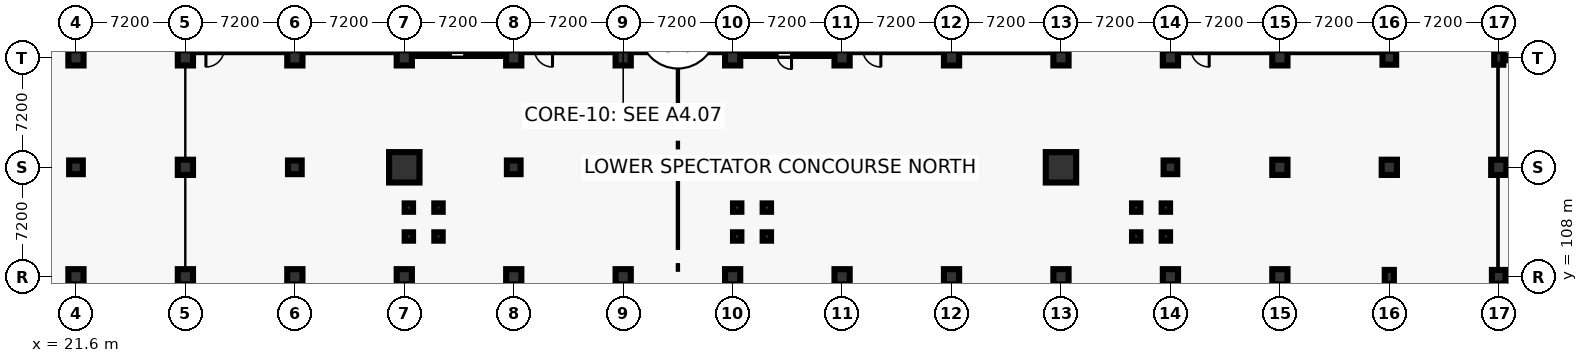
"""IFC4 building model, lengths in metres.
Left out: names, types, materials, properties, quantities, classifications, styles, units other than length and angle.
Written with IfcOpenShell. Run it as: python <this file> out.ifc"""

import sys

from ifc_helpers import new_model, si_unit, direction, frame, frame_2d, origin, origin_2d, place, context, subcontext, project, spatial, rectangle, circle, extrude, element, fill, save


model = new_model("IFC4")
c1 = context("Model", 3, precision=1e-05, world=origin(), true_north=direction((0.0, 1.0)))
c2 = subcontext(c1, "Body", "Model", "MODEL_VIEW")
j1 = project(units=[si_unit("LENGTHUNIT", "METRE"), si_unit("PLANEANGLEUNIT", "RADIAN")], contexts=[c1])
p1 = place(None, origin())
s1 = spatial("IfcSite", under=j1, at=p1, CompositionType="ELEMENT")
p2 = place(p1, origin())
s2 = spatial("IfcBuilding", under=s1, at=p2, CompositionType="ELEMENT")
p3 = place(p2, origin())
s3 = spatial("IfcBuildingStorey", under=s2, at=p3, CompositionType="ELEMENT", Elevation=0.0)
p4 = place(p3, frame((21.6, 108.0, 0.0), z_axis=(0.0, 0.0, 1.0), x_axis=(1.0, 0.0, 0.0)))
e1 = element("IfcColumn", 1, at=p4, inside=s3, PredefinedType="COLUMN", context=c2, shape_type="SweptSolid", body=[
    extrude(rectangle(XDim=1.0, YDim=1.0, at=origin_2d()), origin(), (0.0, 0.0, 1.0), 5.4),
])
p5 = place(p3, frame((21.6, 115.2, 0.0), z_axis=(0.0, 0.0, 1.0), x_axis=(1.0, 0.0, 0.0)))
e2 = element("IfcColumn", 2, at=p5, inside=s3, PredefinedType="COLUMN", context=c2, shape_type="SweptSolid", body=[
    extrude(rectangle(XDim=0.9, YDim=0.9, at=origin_2d()), origin(), (0.0, 0.0, 1.0), 5.4),
])
p6 = place(p3, frame((21.6, 122.4, 0.0), z_axis=(0.0, 0.0, 1.0), x_axis=(1.0, 0.0, 0.0)))
e3 = element("IfcColumn", 3, at=p6, inside=s3, PredefinedType="COLUMN", context=c2, shape_type="SweptSolid", body=[
    extrude(circle(Radius=0.5, at=origin_2d()), origin(), (0.0, 0.0, 1.0), 5.4),
])
p7 = place(p3, frame((28.8, 108.0, 0.0), z_axis=(0.0, 0.0, 1.0), x_axis=(1.0, 0.0, 0.0)))
e4 = element("IfcColumn", 4, at=p7, inside=s3, PredefinedType="COLUMN", context=c2, shape_type="SweptSolid", body=[
    extrude(rectangle(XDim=1.0, YDim=1.0, at=origin_2d()), origin(), (0.0, 0.0, 1.0), 5.4),
])
for number, where, z_axis, x_axis in (
    (5, (28.8, 115.2, 0.0), (0.0, 0.0, 1.0), (1.0, 0.0, 0.0)),
    (6, (28.8, 122.4, 0.0), (0.0, 0.0, 1.0), (1.0, 0.0, 0.0)),
):
    element("IfcColumn", number, at=place(p3, frame(where, z_axis=z_axis, x_axis=x_axis)), inside=s3, PredefinedType="COLUMN", context=c2, shape_type="SweptSolid", body=[
        extrude(circle(Radius=0.5, at=origin_2d()), origin(), (0.0, 0.0, 1.0), 5.4),
    ])
p8 = place(p3, frame((36.0, 108.0, 0.0), z_axis=(0.0, 0.0, 1.0), x_axis=(1.0, 0.0, 0.0)))
e7 = element("IfcColumn", 7, at=p8, inside=s3, PredefinedType="COLUMN", context=c2, shape_type="SweptSolid", body=[
    extrude(rectangle(XDim=1.0, YDim=1.0, at=origin_2d()), origin(), (0.0, 0.0, 1.0), 5.4),
])
p9 = place(p3, frame((36.0, 115.2, 0.0), z_axis=(0.0, 0.0, 1.0), x_axis=(1.0, 0.0, 0.0)))
e8 = element("IfcColumn", 8, at=p9, inside=s3, PredefinedType="COLUMN", context=c2, shape_type="SweptSolid", body=[
    extrude(rectangle(XDim=0.9, YDim=0.9, at=origin_2d()), origin(), (0.0, 0.0, 1.0), 5.4),
])
p10 = place(p3, frame((36.0, 122.4, 0.0), z_axis=(0.0, 0.0, 1.0), x_axis=(1.0, 0.0, 0.0)))
e9 = element("IfcColumn", 9, at=p10, inside=s3, PredefinedType="COLUMN", context=c2, shape_type="SweptSolid", body=[
    extrude(circle(Radius=0.5, at=origin_2d()), origin(), (0.0, 0.0, 1.0), 5.4),
])
p11 = place(p3, frame((43.2, 108.0, 0.0), z_axis=(0.0, 0.0, 1.0), x_axis=(1.0, 0.0, 0.0)))
e10 = element("IfcColumn", 10, at=p11, inside=s3, PredefinedType="COLUMN", context=c2, shape_type="SweptSolid", body=[
    extrude(rectangle(XDim=1.0, YDim=1.0, at=origin_2d()), origin(), (0.0, 0.0, 1.0), 5.4),
])
p12 = place(p3, frame((43.2, 115.2, 0.0), z_axis=(0.0, 0.0, 1.0), x_axis=(1.0, 0.0, 0.0)))
e11 = element("IfcColumn", 11, at=p12, inside=s3, PredefinedType="COLUMN", context=c2, shape_type="SweptSolid", body=[
    extrude(circle(Radius=1.0, at=origin_2d()), origin(), (0.0, 0.0, 1.0), 5.4),
])
p13 = place(p3, frame((43.2, 122.4, 0.0), z_axis=(0.0, 0.0, 1.0), x_axis=(1.0, 0.0, 0.0)))
e12 = element("IfcColumn", 12, at=p13, inside=s3, PredefinedType="COLUMN", context=c2, shape_type="SweptSolid", body=[
    extrude(circle(Radius=0.5, at=origin_2d()), origin(), (0.0, 0.0, 1.0), 5.4),
])
p14 = place(p3, frame((50.4, 108.0, 0.0), z_axis=(0.0, 0.0, 1.0), x_axis=(1.0, 0.0, 0.0)))
e13 = element("IfcColumn", 13, at=p14, inside=s3, PredefinedType="COLUMN", context=c2, shape_type="SweptSolid", body=[
    extrude(rectangle(XDim=1.0, YDim=1.0, at=origin_2d()), origin(), (0.0, 0.0, 1.0), 5.4),
])
p15 = place(p3, frame((50.4, 115.2, 0.0), z_axis=(0.0, 0.0, 1.0), x_axis=(1.0, 0.0, 0.0)))
e14 = element("IfcColumn", 14, at=p15, inside=s3, PredefinedType="COLUMN", context=c2, shape_type="SweptSolid", body=[
    extrude(rectangle(XDim=0.9, YDim=0.9, at=origin_2d()), origin(), (0.0, 0.0, 1.0), 5.4),
])
p16 = place(p3, frame((50.4, 122.4, 0.0), z_axis=(0.0, 0.0, 1.0), x_axis=(1.0, 0.0, 0.0)))
e15 = element("IfcColumn", 15, at=p16, inside=s3, PredefinedType="COLUMN", context=c2, shape_type="SweptSolid", body=[
    extrude(circle(Radius=0.5, at=origin_2d()), origin(), (0.0, 0.0, 1.0), 5.4),
])
p17 = place(p3, frame((57.6, 108.0, 0.0), z_axis=(0.0, 0.0, 1.0), x_axis=(1.0, 0.0, 0.0)))
e16 = element("IfcColumn", 16, at=p17, inside=s3, PredefinedType="COLUMN", context=c2, shape_type="SweptSolid", body=[
    extrude(rectangle(XDim=1.0, YDim=1.0, at=origin_2d()), origin(), (0.0, 0.0, 1.0), 5.4),
])
for number, where, z_axis, x_axis in (
    (17, (57.6, 115.2, 0.0), (0.0, 0.0, 1.0), (1.0, 0.0, 0.0)),
    (18, (57.6, 122.4, 0.0), (0.0, 0.0, 1.0), (1.0, 0.0, 0.0)),
):
    element("IfcColumn", number, at=place(p3, frame(where, z_axis=z_axis, x_axis=x_axis)), inside=s3, PredefinedType="COLUMN", context=c2, shape_type="SweptSolid", body=[
        extrude(circle(Radius=0.5, at=origin_2d()), origin(), (0.0, 0.0, 1.0), 5.4),
    ])
p18 = place(p3, frame((64.8, 108.0, 0.0), z_axis=(0.0, 0.0, 1.0), x_axis=(1.0, 0.0, 0.0)))
e19 = element("IfcColumn", 19, at=p18, inside=s3, PredefinedType="COLUMN", context=c2, shape_type="SweptSolid", body=[
    extrude(rectangle(XDim=1.0, YDim=1.0, at=origin_2d()), origin(), (0.0, 0.0, 1.0), 5.4),
])
p19 = place(p3, frame((64.8, 115.2, 0.0), z_axis=(0.0, 0.0, 1.0), x_axis=(1.0, 0.0, 0.0)))
e20 = element("IfcColumn", 20, at=p19, inside=s3, PredefinedType="COLUMN", context=c2, shape_type="SweptSolid", body=[
    extrude(rectangle(XDim=0.9, YDim=0.9, at=origin_2d()), origin(), (0.0, 0.0, 1.0), 5.4),
])
p20 = place(p3, frame((64.8, 122.4, 0.0), z_axis=(0.0, 0.0, 1.0), x_axis=(1.0, 0.0, 0.0)))
e21 = element("IfcColumn", 21, at=p20, inside=s3, PredefinedType="COLUMN", context=c2, shape_type="SweptSolid", body=[
    extrude(circle(Radius=0.5, at=origin_2d()), origin(), (0.0, 0.0, 1.0), 5.4),
])
p21 = place(p3, frame((72.0, 108.0, 0.0), z_axis=(0.0, 0.0, 1.0), x_axis=(1.0, 0.0, 0.0)))
e22 = element("IfcColumn", 22, at=p21, inside=s3, PredefinedType="COLUMN", context=c2, shape_type="SweptSolid", body=[
    extrude(rectangle(XDim=1.0, YDim=1.0, at=origin_2d()), origin(), (0.0, 0.0, 1.0), 5.4),
])
for number, where, z_axis, x_axis in (
    (23, (72.0, 115.2, 0.0), (0.0, 0.0, 1.0), (1.0, 0.0, 0.0)),
    (24, (72.0, 122.4, 0.0), (0.0, 0.0, 1.0), (1.0, 0.0, 0.0)),
):
    element("IfcColumn", number, at=place(p3, frame(where, z_axis=z_axis, x_axis=x_axis)), inside=s3, PredefinedType="COLUMN", context=c2, shape_type="SweptSolid", body=[
        extrude(circle(Radius=0.5, at=origin_2d()), origin(), (0.0, 0.0, 1.0), 5.4),
    ])
p22 = place(p3, frame((79.2, 108.0, 0.0), z_axis=(0.0, 0.0, 1.0), x_axis=(1.0, 0.0, 0.0)))
e25 = element("IfcColumn", 25, at=p22, inside=s3, PredefinedType="COLUMN", context=c2, shape_type="SweptSolid", body=[
    extrude(rectangle(XDim=1.0, YDim=1.0, at=origin_2d()), origin(), (0.0, 0.0, 1.0), 5.4),
])
p23 = place(p3, frame((79.2, 115.2, 0.0), z_axis=(0.0, 0.0, 1.0), x_axis=(1.0, 0.0, 0.0)))
e26 = element("IfcColumn", 26, at=p23, inside=s3, PredefinedType="COLUMN", context=c2, shape_type="SweptSolid", body=[
    extrude(rectangle(XDim=0.9, YDim=0.9, at=origin_2d()), origin(), (0.0, 0.0, 1.0), 5.4),
])
p24 = place(p3, frame((79.2, 122.4, 0.0), z_axis=(0.0, 0.0, 1.0), x_axis=(1.0, 0.0, 0.0)))
e27 = element("IfcColumn", 27, at=p24, inside=s3, PredefinedType="COLUMN", context=c2, shape_type="SweptSolid", body=[
    extrude(circle(Radius=0.5, at=origin_2d()), origin(), (0.0, 0.0, 1.0), 5.4),
])
p25 = place(p3, frame((86.4, 108.0, 0.0), z_axis=(0.0, 0.0, 1.0), x_axis=(1.0, 0.0, 0.0)))
e28 = element("IfcColumn", 28, at=p25, inside=s3, PredefinedType="COLUMN", context=c2, shape_type="SweptSolid", body=[
    extrude(rectangle(XDim=1.0, YDim=1.0, at=origin_2d()), origin(), (0.0, 0.0, 1.0), 5.4),
])
p26 = place(p3, frame((86.4, 115.2, 0.0), z_axis=(0.0, 0.0, 1.0), x_axis=(1.0, 0.0, 0.0)))
e29 = element("IfcColumn", 29, at=p26, inside=s3, PredefinedType="COLUMN", context=c2, shape_type="SweptSolid", body=[
    extrude(circle(Radius=1.0, at=origin_2d()), origin(), (0.0, 0.0, 1.0), 5.4),
])
p27 = place(p3, frame((86.4, 122.4, 0.0), z_axis=(0.0, 0.0, 1.0), x_axis=(1.0, 0.0, 0.0)))
e30 = element("IfcColumn", 30, at=p27, inside=s3, PredefinedType="COLUMN", context=c2, shape_type="SweptSolid", body=[
    extrude(circle(Radius=0.5, at=origin_2d()), origin(), (0.0, 0.0, 1.0), 5.4),
])
p28 = place(p3, frame((93.6, 108.0, 0.0), z_axis=(0.0, 0.0, 1.0), x_axis=(1.0, 0.0, 0.0)))
e31 = element("IfcColumn", 31, at=p28, inside=s3, PredefinedType="COLUMN", context=c2, shape_type="SweptSolid", body=[
    extrude(rectangle(XDim=1.0, YDim=1.0, at=origin_2d()), origin(), (0.0, 0.0, 1.0), 5.4),
])
p29 = place(p3, frame((93.6, 115.2, 0.0), z_axis=(0.0, 0.0, 1.0), x_axis=(1.0, 0.0, 0.0)))
e32 = element("IfcColumn", 32, at=p29, inside=s3, PredefinedType="COLUMN", context=c2, shape_type="SweptSolid", body=[
    extrude(rectangle(XDim=0.9, YDim=0.9, at=origin_2d()), origin(), (0.0, 0.0, 1.0), 5.4),
])
p30 = place(p3, frame((93.6, 122.4, 0.0), z_axis=(0.0, 0.0, 1.0), x_axis=(1.0, 0.0, 0.0)))
e33 = element("IfcColumn", 33, at=p30, inside=s3, PredefinedType="COLUMN", context=c2, shape_type="SweptSolid", body=[
    extrude(circle(Radius=0.5, at=origin_2d()), origin(), (0.0, 0.0, 1.0), 5.4),
])
p31 = place(p3, frame((100.8, 108.0, 0.0), z_axis=(0.0, 0.0, 1.0), x_axis=(1.0, 0.0, 0.0)))
e34 = element("IfcColumn", 34, at=p31, inside=s3, PredefinedType="COLUMN", context=c2, shape_type="SweptSolid", body=[
    extrude(rectangle(XDim=1.0, YDim=1.0, at=origin_2d()), origin(), (0.0, 0.0, 1.0), 5.4),
])
for number, where, z_axis, x_axis in (
    (35, (100.8, 115.2, 0.0), (0.0, 0.0, 1.0), (1.0, 0.0, 0.0)),
    (36, (100.8, 122.4, 0.0), (0.0, 0.0, 1.0), (1.0, 0.0, 0.0)),
):
    element("IfcColumn", number, at=place(p3, frame(where, z_axis=z_axis, x_axis=x_axis)), inside=s3, PredefinedType="COLUMN", context=c2, shape_type="SweptSolid", body=[
        extrude(circle(Radius=0.5, at=origin_2d()), origin(), (0.0, 0.0, 1.0), 5.4),
    ])
p32 = place(p3, frame((108.0, 108.0, 0.0), z_axis=(0.0, 0.0, 1.0), x_axis=(1.0, 0.0, 0.0)))
e37 = element("IfcColumn", 37, at=p32, inside=s3, PredefinedType="COLUMN", context=c2, shape_type="SweptSolid", body=[
    extrude(rectangle(XDim=0.6, YDim=0.9, at=origin_2d()), origin(), (0.0, 0.0, 1.0), 5.4),
])
p33 = place(p3, frame((108.0, 115.2, 0.0), z_axis=(0.0, 0.0, 1.0), x_axis=(1.0, 0.0, 0.0)))
e38 = element("IfcColumn", 38, at=p33, inside=s3, PredefinedType="COLUMN", context=c2, shape_type="SweptSolid", body=[
    extrude(rectangle(XDim=1.0, YDim=1.0, at=origin_2d()), origin(), (0.0, 0.0, 1.0), 5.4),
])
for number, where, z_axis, x_axis in (
    (39, (108.0, 122.4, 0.0), (0.0, 0.0, 1.0), (1.0, 0.0, 0.0)),
    (40, (115.2, 108.0, 0.0), (0.0, 0.0, 1.0), (1.0, 0.0, 0.0)),
):
    element("IfcColumn", number, at=place(p3, frame(where, z_axis=z_axis, x_axis=x_axis)), inside=s3, PredefinedType="COLUMN", context=c2, shape_type="SweptSolid", body=[
        extrude(rectangle(XDim=0.9, YDim=0.9, at=origin_2d()), origin(), (0.0, 0.0, 1.0), 5.4),
    ])
p34 = place(p3, frame((115.2, 115.2, 0.0), z_axis=(0.0, 0.0, 1.0), x_axis=(1.0, 0.0, 0.0)))
e41 = element("IfcColumn", 41, at=p34, inside=s3, PredefinedType="COLUMN", context=c2, shape_type="SweptSolid", body=[
    extrude(circle(Radius=0.5, at=origin_2d()), origin(), (0.0, 0.0, 1.0), 5.4),
])
p35 = place(p3, frame((115.2, 122.4, 0.0), z_axis=(0.0, 0.0, 1.0), x_axis=(1.0, 0.0, 0.0)))
e42 = element("IfcColumn", 42, at=p35, inside=s3, PredefinedType="COLUMN", context=c2, shape_type="SweptSolid", body=[
    extrude(rectangle(XDim=0.6, YDim=0.9, at=origin_2d()), origin(), (0.0, 0.0, 1.0), 5.4),
])
p36 = place(p3, frame((29.6, 123.0, 0.0), z_axis=(0.0, 0.0, 1.0), x_axis=(1.0, 0.0, 0.0)))
e43 = element("IfcWall", 43, at=p36, inside=s3, PredefinedType="SHEAR", context=c2, shape_type="SweptSolid", body=[
    extrude(rectangle(XDim=12.8, YDim=0.45, at=frame_2d((6.4, 0.0))), origin(), (0.0, 0.0, 1.0), 5.06),
])
p37 = place(p36, frame((0.55, 0.0, 0.0)))
e44 = element("IfcOpeningElement", 44, at=p37, cuts=e43, PredefinedType="OPENING", context=c2, shape_type="SweptSolid", body=[
    extrude(rectangle(XDim=1.2, YDim=2.25, at=frame_2d((0.6, 1.125))), frame((0.0, 0.235, 0.0), z_axis=(0.0, -1.0, 0.0), x_axis=(1.0, 0.0, 0.0)), (0.0, 0.0, 1.0), 0.47),
])
p38 = place(p36, frame((10.458, 0.0, 0.0)))
e45 = element("IfcOpeningElement", 45, at=p38, cuts=e43, PredefinedType="OPENING", context=c2, shape_type="SweptSolid", body=[
    extrude(rectangle(XDim=1.1, YDim=2.2, at=frame_2d((0.55, 1.1))), frame((0.0, 0.235, 0.0), z_axis=(0.0, -1.0, 0.0), x_axis=(1.0, 0.0, 0.0)), (0.0, 0.0, 1.0), 0.47),
])
p39 = place(p3, frame((72.8, 123.0, 0.0), z_axis=(0.0, 0.0, 1.0), x_axis=(1.0, 0.0, 0.0)))
e46 = element("IfcWall", 46, at=p39, inside=s3, PredefinedType="SHEAR", context=c2, shape_type="SweptSolid", body=[
    extrude(rectangle(XDim=12.8, YDim=0.45, at=frame_2d((6.4, 0.0))), origin(), (0.0, 0.0, 1.0), 5.06),
])
p40 = place(p39, frame((0.55, 0.0, 0.0)))
e47 = element("IfcOpeningElement", 47, at=p40, cuts=e46, PredefinedType="OPENING", context=c2, shape_type="SweptSolid", body=[
    extrude(rectangle(XDim=1.2, YDim=2.25, at=frame_2d((0.6, 1.125))), frame((0.0, 0.235, 0.0), z_axis=(0.0, -1.0, 0.0), x_axis=(1.0, 0.0, 0.0)), (0.0, 0.0, 1.0), 0.47),
])
p41 = place(p39, frame((10.458, 0.0, 0.0)))
e48 = element("IfcOpeningElement", 48, at=p41, cuts=e46, PredefinedType="OPENING", context=c2, shape_type="SweptSolid", body=[
    extrude(rectangle(XDim=1.1, YDim=2.2, at=frame_2d((0.55, 1.1))), frame((0.0, 0.235, 0.0), z_axis=(0.0, -1.0, 0.0), x_axis=(1.0, 0.0, 0.0)), (0.0, 0.0, 1.0), 0.47),
])
p42 = place(p3, frame((51.2, 123.0, 0.0), z_axis=(0.0, 0.0, 1.0), x_axis=(1.0, 0.0, 0.0)))
e49 = element("IfcWall", 49, at=p42, inside=s3, PredefinedType="SHEAR", context=c2, shape_type="SweptSolid", body=[
    extrude(rectangle(XDim=12.8, YDim=0.45, at=frame_2d((6.4, 0.0))), origin(), (0.0, 0.0, 1.0), 5.06),
])
p43 = place(p42, frame((0.55, 0.0, 0.0)))
e50 = element("IfcOpeningElement", 50, at=p43, cuts=e49, PredefinedType="OPENING", context=c2, shape_type="SweptSolid", body=[
    extrude(rectangle(XDim=1.2, YDim=2.25, at=frame_2d((0.6, 1.125))), frame((0.0, 0.235, 0.0), z_axis=(0.0, -1.0, 0.0), x_axis=(1.0, 0.0, 0.0)), (0.0, 0.0, 1.0), 0.47),
])
p44 = place(p42, frame((10.458, 0.0, 0.0)))
e51 = element("IfcOpeningElement", 51, at=p44, cuts=e49, PredefinedType="OPENING", context=c2, shape_type="SweptSolid", body=[
    extrude(rectangle(XDim=1.1, YDim=2.2, at=frame_2d((0.55, 1.1))), frame((0.0, 0.235, 0.0), z_axis=(0.0, -1.0, 0.0), x_axis=(1.0, 0.0, 0.0)), (0.0, 0.0, 1.0), 0.47),
])
p45 = place(p3, frame((94.4, 123.0, 0.0), z_axis=(0.0, 0.0, 1.0), x_axis=(1.0, 0.0, 0.0)))
e52 = element("IfcWall", 52, at=p45, inside=s3, PredefinedType="SHEAR", context=c2, shape_type="SweptSolid", body=[
    extrude(rectangle(XDim=12.8, YDim=0.45, at=frame_2d((6.4, 0.0))), origin(), (0.0, 0.0, 1.0), 5.06),
])
p46 = place(p45, frame((0.55, 0.0, 0.0)))
e53 = element("IfcOpeningElement", 53, at=p46, cuts=e52, PredefinedType="OPENING", context=c2, shape_type="SweptSolid", body=[
    extrude(rectangle(XDim=1.2, YDim=2.25, at=frame_2d((0.6, 1.125))), frame((0.0, 0.235, 0.0), z_axis=(0.0, -1.0, 0.0), x_axis=(1.0, 0.0, 0.0)), (0.0, 0.0, 1.0), 0.47),
])
p47 = place(p45, frame((10.108, 0.0, 0.0)))
e54 = element("IfcOpeningElement", 54, at=p47, cuts=e52, PredefinedType="OPENING", context=c2, shape_type="SweptSolid", body=[
    extrude(rectangle(XDim=1.8, YDim=2.4, at=frame_2d((0.9, 1.2))), frame((0.0, 0.235, 0.0), z_axis=(0.0, -1.0, 0.0), x_axis=(1.0, 0.0, 0.0)), (0.0, 0.0, 1.0), 0.47),
])
for number, where, z_axis, x_axis in (
    (55, (43.5, 110.65, 0.0), (0.0, 0.0, 1.0), (1.0, 0.0, 0.0)),
    (56, (45.45, 110.65, 0.0), (0.0, 0.0, 1.0), (1.0, 0.0, 0.0)),
    (57, (43.5, 112.55, 0.0), (0.0, 0.0, 1.0), (1.0, 0.0, 0.0)),
    (58, (45.45, 112.55, 0.0), (0.0, 0.0, 1.0), (1.0, 0.0, 0.0)),
    (59, (65.1, 110.65, 0.0), (0.0, 0.0, 1.0), (1.0, 0.0, 0.0)),
    (60, (67.05, 110.65, 0.0), (0.0, 0.0, 1.0), (1.0, 0.0, 0.0)),
    (61, (65.1, 112.55, 0.0), (0.0, 0.0, 1.0), (1.0, 0.0, 0.0)),
    (62, (67.05, 112.55, 0.0), (0.0, 0.0, 1.0), (1.0, 0.0, 0.0)),
    (63, (91.35, 110.65, 0.0), (0.0, 0.0, 1.0), (1.0, 0.0, 0.0)),
    (64, (93.3, 110.65, 0.0), (0.0, 0.0, 1.0), (1.0, 0.0, 0.0)),
    (65, (91.35, 112.55, 0.0), (0.0, 0.0, 1.0), (1.0, 0.0, 0.0)),
    (66, (93.3, 112.55, 0.0), (0.0, 0.0, 1.0), (1.0, 0.0, 0.0)),
):
    element("IfcColumn", number, at=place(p3, frame(where, z_axis=z_axis, x_axis=x_axis)), inside=s3, PredefinedType="COLUMN", context=c2, shape_type="SweptSolid", body=[
        extrude(rectangle(XDim=0.55, YDim=0.55, at=origin_2d()), origin(), (0.0, 0.0, 1.0), 5.4),
    ])
p48 = place(p3, frame((115.55, 122.4, 0.0), z_axis=(0.0, 0.0, 1.0), x_axis=(1.0, 0.0, 0.0)))
e67 = element("IfcWall", 67, at=p48, inside=s3, PredefinedType="SOLIDWALL", context=c2, shape_type="SweptSolid", body=[
    extrude(rectangle(XDim=6.5, YDim=0.31, at=frame_2d((3.25, 0.0))), origin(), (0.0, 0.0, 1.0), 4.1),
])
p49 = place(p48, frame((2.3, 0.0, 0.0)))
e68 = element("IfcOpeningElement", 68, at=p49, cuts=e67, PredefinedType="OPENING", context=c2, shape_type="SweptSolid", body=[
    extrude(rectangle(XDim=1.9, YDim=2.4, at=frame_2d((0.95, 1.2))), frame((0.0, 0.165, 0.0), z_axis=(0.0, -1.0, 0.0), x_axis=(1.0, 0.0, 0.0)), (0.0, 0.0, 1.0), 0.33),
])
p50 = place(p3, frame((43.6, 122.6, 0.0), z_axis=(0.0, 0.0, 1.0), x_axis=(1.0, 0.0, 0.0)))
e69 = element("IfcWall", 69, at=p50, inside=s3, PredefinedType="PARTITIONING", context=c2, shape_type="SweptSolid", body=[
    extrude(rectangle(XDim=6.2, YDim=0.15, at=frame_2d((3.1, 0.0))), origin(), (0.0, 0.0, 1.0), 4.1),
])
p51 = place(p50, frame((2.625, 0.0, 0.0)))
e70 = element("IfcOpeningElement", 70, at=p51, cuts=e69, PredefinedType="OPENING", context=c2, shape_type="SweptSolid", body=[
    extrude(rectangle(XDim=0.95, YDim=2.15, at=frame_2d((0.475, 1.075))), frame((0.0, 0.085, 0.0), z_axis=(0.0, -1.0, 0.0), x_axis=(1.0, 0.0, 0.0)), (0.0, 0.0, 1.0), 0.17),
])
for number, where, z_axis, x_axis in (
    (71, (49.8, 122.6, 0.0), (0.0, 0.0, 1.0), (0.0, 1.0, 0.0)),
    (72, (43.6, 128.4, 0.0), (0.0, 0.0, 1.0), (0.0, -1.0, 0.0)),
):
    element("IfcWall", number, at=place(p3, frame(where, z_axis=z_axis, x_axis=x_axis)), inside=s3, PredefinedType="PARTITIONING", context=c2, shape_type="SweptSolid", body=[
        extrude(rectangle(XDim=5.8, YDim=0.15, at=frame_2d((2.9, 0.0))), origin(), (0.0, 0.0, 1.0), 4.1),
    ])
p52 = place(p3, frame((65.2, 122.6, 0.0), z_axis=(0.0, 0.0, 1.0), x_axis=(1.0, 0.0, 0.0)))
e73 = element("IfcWall", 73, at=p52, inside=s3, PredefinedType="PARTITIONING", context=c2, shape_type="SweptSolid", body=[
    extrude(rectangle(XDim=6.0, YDim=0.15, at=frame_2d((3.0, 0.0))), origin(), (0.0, 0.0, 1.0), 4.1),
])
p53 = place(p52, frame((2.525, 0.0, 0.0)))
e74 = element("IfcOpeningElement", 74, at=p53, cuts=e73, PredefinedType="OPENING", context=c2, shape_type="SweptSolid", body=[
    extrude(rectangle(XDim=0.95, YDim=2.15, at=frame_2d((0.475, 1.075))), frame((0.0, 0.085, 0.0), z_axis=(0.0, -1.0, 0.0), x_axis=(1.0, 0.0, 0.0)), (0.0, 0.0, 1.0), 0.17),
])
for number, where, z_axis, x_axis in (
    (75, (71.2, 122.6, 0.0), (0.0, 0.0, 1.0), (0.0, 1.0, 0.0)),
    (76, (65.2, 128.4, 0.0), (0.0, 0.0, 1.0), (0.0, -1.0, 0.0)),
):
    element("IfcWall", number, at=place(p3, frame(where, z_axis=z_axis, x_axis=x_axis)), inside=s3, PredefinedType="PARTITIONING", context=c2, shape_type="SweptSolid", body=[
        extrude(rectangle(XDim=5.8, YDim=0.15, at=frame_2d((2.9, 0.0))), origin(), (0.0, 0.0, 1.0), 4.1),
    ])
p54 = place(p51, origin())
e77 = element("IfcDoor", 77, at=p54, inside=s3, OperationType="SINGLE_SWING_LEFT", PredefinedType="DOOR", context=c2, shape_type="SweptSolid", body=[
    extrude(rectangle(XDim=0.95, YDim=2.15, at=frame_2d((0.475, 1.075))), frame((0.0, 0.025, 0.0), z_axis=(0.0, -1.0, 0.0), x_axis=(1.0, 0.0, 0.0)), (0.0, 0.0, 1.0), 0.05),
])
fill(e70, e77)
p55 = place(p53, frame((0.95, 0.0, 0.0), z_axis=(0.0, 0.0, 1.0), x_axis=(-1.0, 0.0, 0.0)))
e78 = element("IfcDoor", 78, at=p55, inside=s3, OperationType="SINGLE_SWING_RIGHT", PredefinedType="DOOR", context=c2, shape_type="SweptSolid", body=[
    extrude(rectangle(XDim=0.95, YDim=2.15, at=frame_2d((0.475, 1.075))), frame((0.0, 0.025, 0.0), z_axis=(0.0, -1.0, 0.0), x_axis=(1.0, 0.0, 0.0)), (0.0, 0.0, 1.0), 0.05),
])
fill(e74, e78)
save(model, sys.argv[1])
